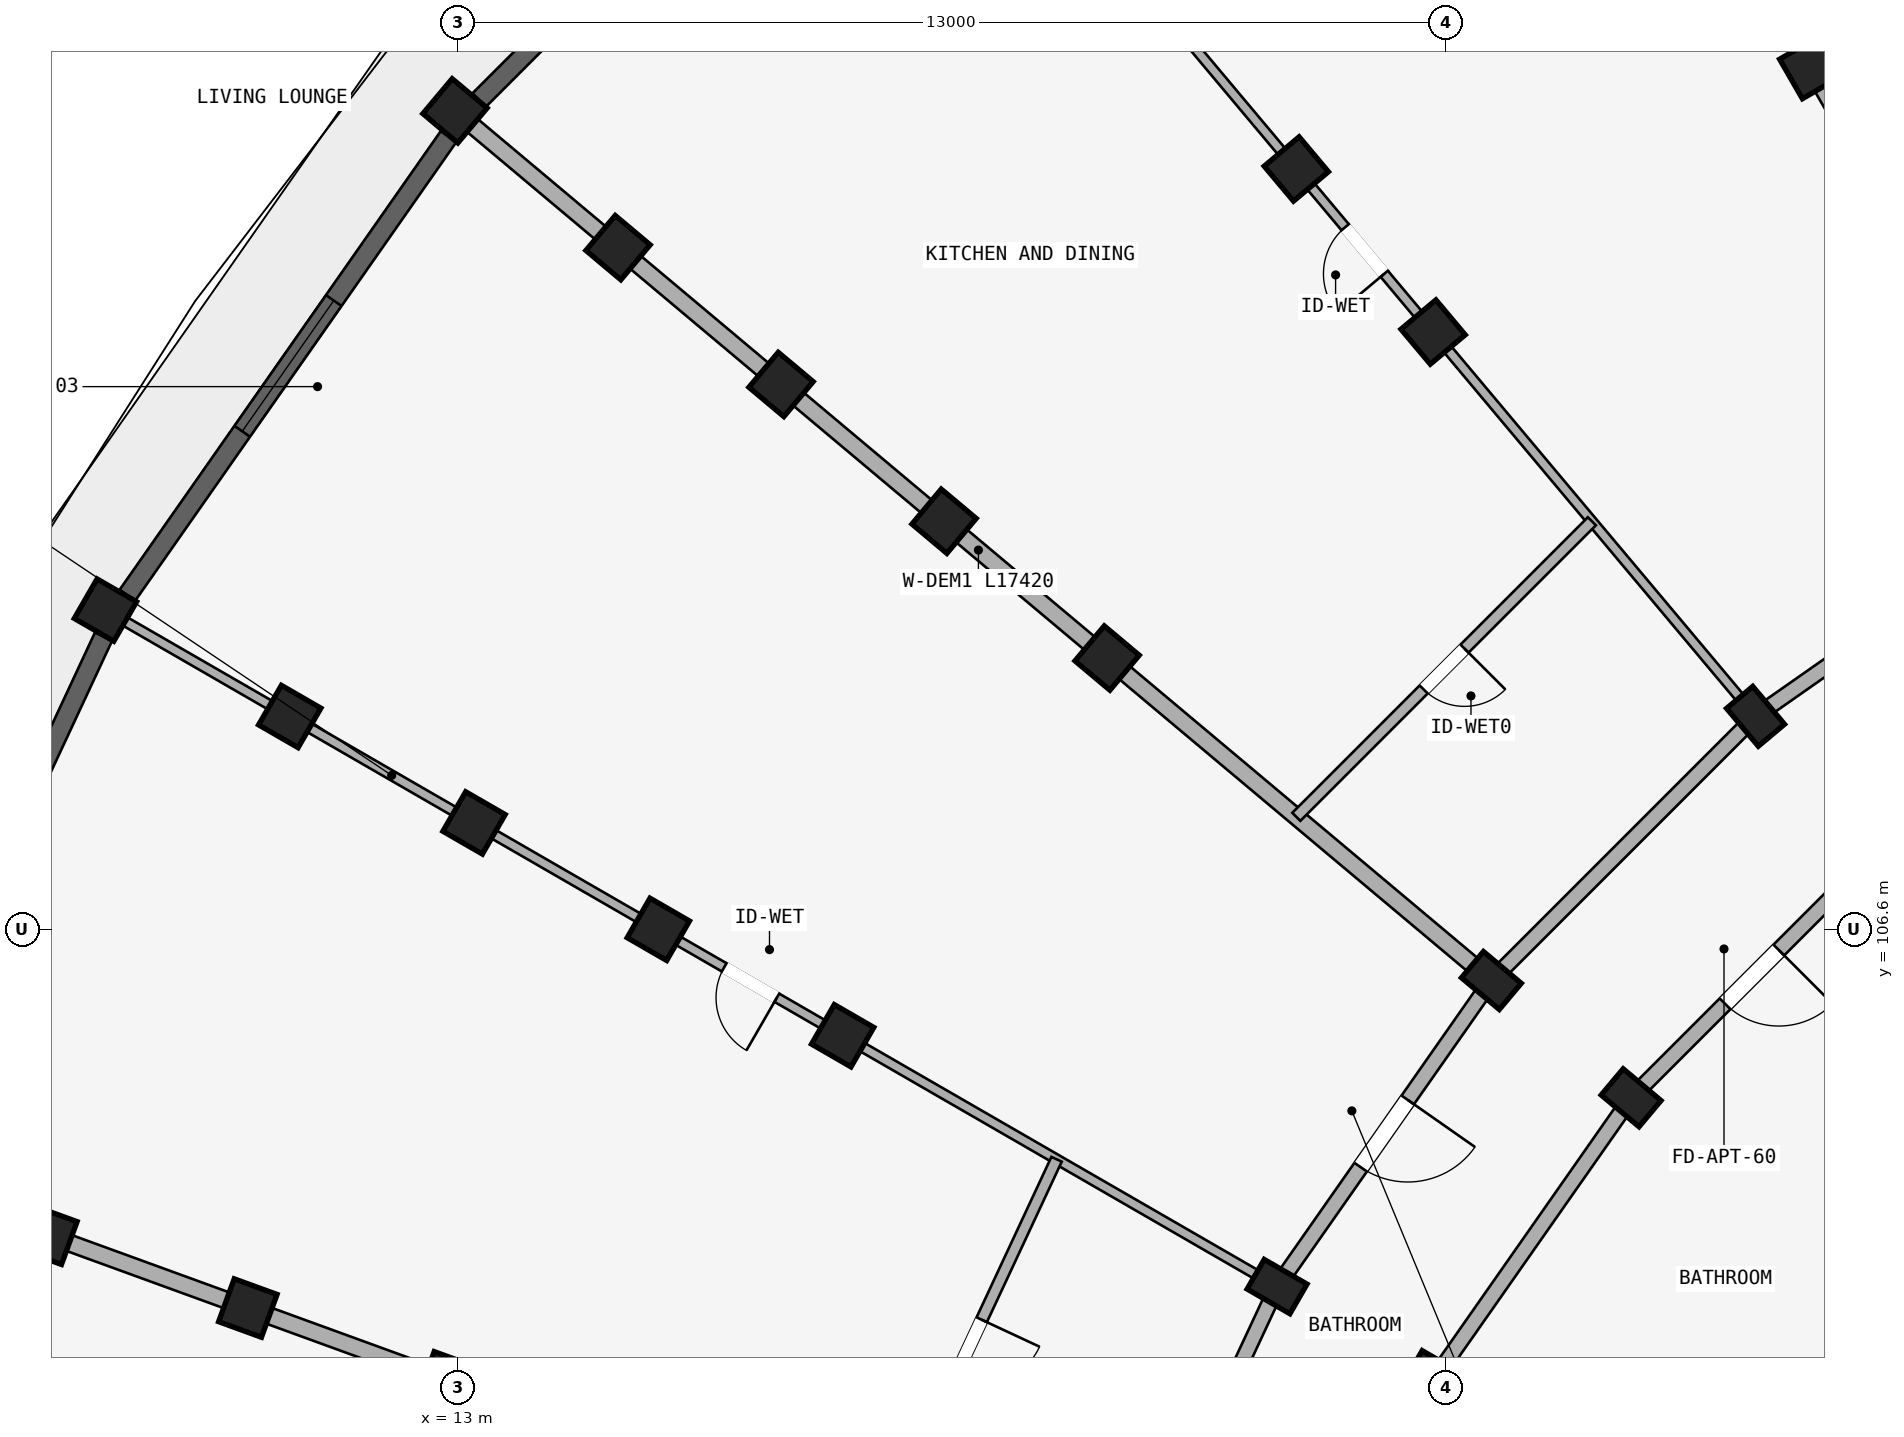
"""IFC4 building model, lengths in metres.
Left out: names, types, materials, properties, quantities, classifications, styles, units other than length and angle.
Written with IfcOpenShell. Run it as: python <this file> out.ifc"""

import sys

from ifc_helpers import new_model, si_unit, direction, frame, frame_2d, origin, origin_2d, place, context, subcontext, project, spatial, rectangle, extrude, element, fill, save


model = new_model("IFC4")
c1 = context("Model", 3, precision=1e-05, world=origin(), true_north=direction((0.0, 1.0)))
c2 = subcontext(c1, "Body", "Model", "MODEL_VIEW")
j1 = project(units=[si_unit("LENGTHUNIT", "METRE"), si_unit("PLANEANGLEUNIT", "RADIAN")], contexts=[c1])
p1 = place(None, origin())
s1 = spatial("IfcSite", under=j1, at=p1, CompositionType="ELEMENT")
p2 = place(p1, origin())
s2 = spatial("IfcBuilding", under=s1, at=p2, CompositionType="ELEMENT")
p3 = place(p2, frame((0.0, 0.0, 33.9)))
s3 = spatial("IfcBuildingStorey", under=s2, at=p3, CompositionType="ELEMENT", Elevation=33.9)
p4 = place(p3, frame((30.8, 117.938, 0.0), z_axis=(0.0, 0.0, 1.0), x_axis=(0.866025403784, 0.5, 0.0)))
e1 = element("IfcColumn", 1, at=p4, inside=s3, PredefinedType="COLUMN", context=c2, shape_type="SweptSolid", body=[
    extrude(rectangle(XDim=0.6, YDim=0.6, at=origin_2d()), origin(), (0.0, 0.0, 1.0), 2.93),
])
p5 = place(p3, frame((30.073, 109.402, 0.0), z_axis=(0.0, 0.0, 1.0), x_axis=(0.766044443119, 0.642787609687, 0.0)))
e2 = element("IfcColumn", 2, at=p5, inside=s3, PredefinedType="COLUMN", context=c2, shape_type="SweptSolid", body=[
    extrude(rectangle(XDim=0.45, YDim=0.65, at=origin_2d()), origin(), (0.0, 0.0, 1.0), 2.93),
])
for number, where, z_axis, x_axis in (
    (3, (25.831, 114.458, 0.0), (0.0, 0.0, 1.0), (0.766, 0.643, 0.0)),
    (4, (24.031, 116.603, 0.0), (0.0, 0.0, 1.0), (0.766, 0.643, 0.0)),
):
    element("IfcColumn", number, at=place(p3, frame(where, z_axis=z_axis, x_axis=x_axis)), inside=s3, PredefinedType="COLUMN", context=c2, shape_type="SweptSolid", body=[
        extrude(rectangle(XDim=0.6, YDim=0.6, at=origin_2d()), origin(), (0.0, 0.0, 1.0), 2.93),
    ])
for number, where, z_axis, x_axis in (
    (5, (28.436, 104.384, 0.0), (0.0, 0.0, 1.0), (0.643, 0.766, 0.0)),
    (6, (26.598, 105.927, 0.0), (0.0, 0.0, 1.0), (0.643, 0.766, 0.0)),
):
    element("IfcColumn", number, at=place(p3, frame(where, z_axis=z_axis, x_axis=x_axis)), inside=s3, PredefinedType="COLUMN", context=c2, shape_type="SweptSolid", body=[
        extrude(rectangle(XDim=0.45, YDim=0.65, at=origin_2d()), origin(), (0.0, 0.0, 1.0), 2.93),
    ])
for number, where, z_axis, x_axis in (
    (7, (21.542, 110.169, 0.0), (0.0, 0.0, 1.0), (0.643, 0.766, 0.0)),
    (8, (19.397, 111.969, 0.0), (0.0, 0.0, 1.0), (0.643, 0.766, 0.0)),
    (9, (17.252, 113.769, 0.0), (0.0, 0.0, 1.0), (0.643, 0.766, 0.0)),
    (10, (15.107, 115.568, 0.0), (0.0, 0.0, 1.0), (0.643, 0.766, 0.0)),
    (11, (12.962, 117.368, 0.0), (0.0, 0.0, 1.0), (0.643, 0.766, 0.0)),
):
    element("IfcColumn", number, at=place(p3, frame(where, z_axis=z_axis, x_axis=x_axis)), inside=s3, PredefinedType="COLUMN", context=c2, shape_type="SweptSolid", body=[
        extrude(rectangle(XDim=0.6, YDim=0.6, at=origin_2d()), origin(), (0.0, 0.0, 1.0), 2.93),
    ])
for number, where, z_axis, x_axis in (
    (12, (25.856, 100.7, 0.0), (0.0, 0.0, 1.0), (0.5, 0.866, 0.0)),
    (13, (23.778, 101.9, 0.0), (0.0, 0.0, 1.0), (0.5, 0.866, 0.0)),
):
    element("IfcColumn", number, at=place(p3, frame(where, z_axis=z_axis, x_axis=x_axis)), inside=s3, PredefinedType="COLUMN", context=c2, shape_type="SweptSolid", body=[
        extrude(rectangle(XDim=0.45, YDim=0.65, at=origin_2d()), origin(), (0.0, 0.0, 1.0), 2.93),
    ])
for number, where, z_axis, x_axis in (
    (14, (18.062, 105.2, 0.0), (0.0, 0.0, 1.0), (0.5, 0.866, 0.0)),
    (15, (15.637, 106.6, 0.0), (0.0, 0.0, 1.0), (0.5, 0.866, 0.0)),
    (16, (13.213, 108.0, 0.0), (0.0, 0.0, 1.0), (0.5, 0.866, 0.0)),
    (17, (10.788, 109.4, 0.0), (0.0, 0.0, 1.0), (0.5, 0.866, 0.0)),
    (18, (8.363, 110.8, 0.0), (0.0, 0.0, 1.0), (0.5, 0.866, 0.0)),
    (19, (12.868, 100.66, 0.0), (0.0, 0.0, 1.0), (0.342, 0.94, 0.0)),
    (20, (10.236, 101.618, 0.0), (0.0, 0.0, 1.0), (0.342, 0.94, 0.0)),
    (21, (7.605, 102.575, 0.0), (0.0, 0.0, 1.0), (0.342, 0.94, 0.0)),
):
    element("IfcColumn", number, at=place(p3, frame(where, z_axis=z_axis, x_axis=x_axis)), inside=s3, PredefinedType="COLUMN", context=c2, shape_type="SweptSolid", body=[
        extrude(rectangle(XDim=0.6, YDim=0.6, at=origin_2d()), origin(), (0.0, 0.0, 1.0), 2.93),
    ])
p6 = place(p3, frame((34.1, 112.222, 0.0), z_axis=(0.0, 0.0, 1.0), x_axis=(-0.819140911474, -0.573592335331, 0.0)))
e22 = element("IfcWall", 22, at=p6, inside=s3, PredefinedType="STANDARD", context=c2, shape_type="SweptSolid", body=[
    extrude(rectangle(XDim=4.916, YDim=0.2, at=frame_2d((2.458, 0.0))), origin(), (0.0, 0.0, 1.0), 2.372),
])
p7 = place(p6, frame((1.938, 0.0, 0.0)))
e23 = element("IfcOpeningElement", 23, at=p7, cuts=e22, PredefinedType="OPENING", context=c2, shape_type="SweptSolid", body=[
    extrude(rectangle(XDim=1.04, YDim=2.15, at=frame_2d((0.52, 1.075))), frame((0.0, 0.11, 0.0), z_axis=(0.0, -1.0, 0.0), x_axis=(1.0, 0.0, 0.0)), (0.0, 0.0, 1.0), 0.22),
])
p8 = place(p3, frame((31.616, 107.564, 0.0), z_axis=(0.0, 0.0, 1.0), x_axis=(-0.707106781187, -0.707106781187, 0.0)))
e24 = element("IfcWall", 24, at=p8, inside=s3, PredefinedType="STANDARD", context=c2, shape_type="SweptSolid", body=[
    extrude(rectangle(XDim=4.497, YDim=0.2, at=frame_2d((2.249, 0.0))), origin(), (0.0, 0.0, 1.0), 2.372),
])
p9 = place(p8, frame((1.749, 0.0, 0.0)))
e25 = element("IfcOpeningElement", 25, at=p9, cuts=e24, PredefinedType="OPENING", context=c2, shape_type="SweptSolid", body=[
    extrude(rectangle(XDim=1.0, YDim=2.15, at=frame_2d((0.5, 1.075))), frame((0.0, 0.11, 0.0), z_axis=(0.0, -1.0, 0.0), x_axis=(1.0, 0.0, 0.0)), (0.0, 0.0, 1.0), 0.22),
])
p10 = place(p3, frame((30.073, 109.402, 0.0), z_axis=(0.0, 0.0, 1.0), x_axis=(-0.707106781187, -0.707106781187, 0.0)))
e26 = element("IfcWall", 26, at=p10, inside=s3, PredefinedType="STANDARD", context=c2, shape_type="SweptSolid", body=[
    extrude(rectangle(XDim=4.916, YDim=0.2, at=frame_2d((2.458, 0.0))), origin(), (0.0, 0.0, 1.0), 2.372),
])
p11 = place(p3, frame((28.436, 104.384, 0.0), z_axis=(0.0, 0.0, 1.0), x_axis=(-0.573571637217, -0.819155404658, 0.0)))
e27 = element("IfcWall", 27, at=p11, inside=s3, PredefinedType="STANDARD", context=c2, shape_type="SweptSolid", body=[
    extrude(rectangle(XDim=4.497, YDim=0.2, at=frame_2d((2.249, 0.0))), origin(), (0.0, 0.0, 1.0), 2.372),
])
p12 = place(p3, frame((26.598, 105.927, 0.0), z_axis=(0.0, 0.0, 1.0), x_axis=(-0.573592335331, -0.819140911474, 0.0)))
e28 = element("IfcWall", 28, at=p12, inside=s3, PredefinedType="STANDARD", context=c2, shape_type="SweptSolid", body=[
    extrude(rectangle(XDim=4.916, YDim=0.2, at=frame_2d((2.458, 0.0))), origin(), (0.0, 0.0, 1.0), 2.372),
])
p13 = place(p12, frame((1.918, 0.0, 0.0)))
e29 = element("IfcOpeningElement", 29, at=p13, cuts=e28, PredefinedType="OPENING", context=c2, shape_type="SweptSolid", body=[
    extrude(rectangle(XDim=1.08, YDim=2.15, at=frame_2d((0.54, 1.075))), frame((0.0, 0.11, 0.0), z_axis=(0.0, -1.0, 0.0), x_axis=(1.0, 0.0, 0.0)), (0.0, 0.0, 1.0), 0.22),
])
p14 = place(p3, frame((23.778, 101.9, 0.0), z_axis=(0.0, 0.0, 1.0), x_axis=(-0.422629854778, -0.906302381024, 0.0)))
e30 = element("IfcWall", 30, at=p14, inside=s3, PredefinedType="STANDARD", context=c2, shape_type="SweptSolid", body=[
    extrude(rectangle(XDim=4.915, YDim=0.2, at=frame_2d((2.458, 0.0))), origin(), (0.0, 0.0, 1.0), 2.372),
])
p15 = place(p3, frame((34.05, 112.309, 0.0), z_axis=(0.0, 0.0, 1.0), x_axis=(-0.499997843263, 0.866026648973, 0.0)))
e31 = element("IfcWall", 31, at=p15, inside=s3, PredefinedType="STANDARD", context=c2, shape_type="SweptSolid", body=[
    extrude(rectangle(XDim=17.42, YDim=0.22, at=frame_2d((8.71, 0.0))), origin(), (0.0, 0.0, 1.0), 2.372),
])
p16 = place(p3, frame((30.009, 109.479, 0.0), z_axis=(0.0, 0.0, 1.0), x_axis=(-0.642784757967, 0.766046835987, 0.0)))
e32 = element("IfcWall", 32, at=p16, inside=s3, PredefinedType="PARTITIONING", context=c2, shape_type="SweptSolid", body=[
    extrude(rectangle(XDim=17.42, YDim=0.125, at=frame_2d((8.71, 0.0))), origin(), (0.0, 0.0, 1.0), 2.372),
])
p17 = place(p16, frame((7.5, 0.0, 0.0)))
e33 = element("IfcOpeningElement", 33, at=p17, cuts=e32, PredefinedType="OPENING", context=c2, shape_type="SweptSolid", body=[
    extrude(rectangle(XDim=0.8, YDim=2.1, at=frame_2d((0.4, 1.05))), frame((0.0, 0.073, 0.0), z_axis=(0.0, -1.0, 0.0), x_axis=(1.0, 0.0, 0.0)), (0.0, 0.0, 1.0), 0.145),
])
p18 = place(p3, frame((26.521, 105.991, 0.0), z_axis=(0.0, 0.0, 1.0), x_axis=(-0.766046835987, 0.642784757967, 0.0)))
e34 = element("IfcWall", 34, at=p18, inside=s3, PredefinedType="STANDARD", context=c2, shape_type="SweptSolid", body=[
    extrude(rectangle(XDim=17.42, YDim=0.22, at=frame_2d((8.71, 0.0))), origin(), (0.0, 0.0, 1.0), 2.372),
])
p19 = place(p3, frame((23.691, 101.95, 0.0), z_axis=(0.0, 0.0, 1.0), x_axis=(-0.866026648973, 0.499997843263, 0.0)))
e35 = element("IfcWall", 35, at=p19, inside=s3, PredefinedType="PARTITIONING", context=c2, shape_type="SweptSolid", body=[
    extrude(rectangle(XDim=17.42, YDim=0.125, at=frame_2d((8.71, 0.0))), origin(), (0.0, 0.0, 1.0), 2.372),
])
p20 = place(p19, frame((7.5, 0.0, 0.0)))
e36 = element("IfcOpeningElement", 36, at=p20, cuts=e35, PredefinedType="OPENING", context=c2, shape_type="SweptSolid", body=[
    extrude(rectangle(XDim=0.8, YDim=2.1, at=frame_2d((0.4, 1.05))), frame((0.0, 0.073, 0.0), z_axis=(0.0, -1.0, 0.0), x_axis=(1.0, 0.0, 0.0)), (0.0, 0.0, 1.0), 0.145),
])
p21 = place(p3, frame((21.607, 97.479, 0.0), z_axis=(0.0, 0.0, 1.0), x_axis=(-0.939691901159, 0.342022120477, 0.0)))
e37 = element("IfcWall", 37, at=p21, inside=s3, PredefinedType="STANDARD", context=c2, shape_type="SweptSolid", body=[
    extrude(rectangle(XDim=17.42, YDim=0.22, at=frame_2d((8.71, 0.0))), origin(), (0.0, 0.0, 1.0), 2.372),
])
p22 = place(p3, frame((27.92, 111.969, 0.0), z_axis=(0.0, 0.0, 1.0), x_axis=(-0.707106781187, -0.707106781187, 0.0)))
e38 = element("IfcWall", 38, at=p22, inside=s3, PredefinedType="PLUMBINGWALL", context=c2, shape_type="SweptSolid", body=[
    extrude(rectangle(XDim=5.5, YDim=0.15, at=frame_2d((2.75, 0.0))), origin(), (0.0, 0.0, 1.0), 2.372),
])
p23 = place(p22, frame((2.37, 0.0, 0.0)))
e39 = element("IfcOpeningElement", 39, at=p23, cuts=e38, PredefinedType="OPENING", context=c2, shape_type="SweptSolid", body=[
    extrude(rectangle(XDim=0.76, YDim=2.05, at=frame_2d((0.38, 1.025))), frame((0.0, 0.085, 0.0), z_axis=(0.0, -1.0, 0.0), x_axis=(1.0, 0.0, 0.0)), (0.0, 0.0, 1.0), 0.17),
])
p24 = place(p3, frame((20.877, 103.575, 0.0), z_axis=(0.0, 0.0, 1.0), x_axis=(-0.422630264446, -0.906302189986, 0.0)))
e40 = element("IfcWall", 40, at=p24, inside=s3, PredefinedType="PLUMBINGWALL", context=c2, shape_type="SweptSolid", body=[
    extrude(rectangle(XDim=5.5, YDim=0.15, at=frame_2d((2.75, 0.0))), origin(), (0.0, 0.0, 1.0), 2.372),
])
p25 = place(p24, frame((2.33, 0.0, 0.0)))
e41 = element("IfcOpeningElement", 41, at=p25, cuts=e40, PredefinedType="OPENING", context=c2, shape_type="SweptSolid", body=[
    extrude(rectangle(XDim=0.84, YDim=2.1, at=frame_2d((0.42, 1.05))), frame((0.0, 0.085, 0.0), z_axis=(0.0, -1.0, 0.0), x_axis=(1.0, 0.0, 0.0)), (0.0, 0.0, 1.0), 0.17),
])
p26 = place(p3, frame((18.49, 122.719, 0.0), z_axis=(0.0, 0.0, 1.0), x_axis=(-0.707106781187, -0.707106781187, 0.0)))
e42 = element("IfcWall", 42, at=p26, inside=s3, PredefinedType="STANDARD", context=c2, shape_type="SweptSolid", body=[
    extrude(rectangle(XDim=7.367, YDim=0.25, at=frame_2d((3.684, 0.0))), origin(), (0.0, 0.0, 1.0), 2.472),
])
p27 = place(p26, frame((4.84, 0.0, 0.322)))
e43 = element("IfcOpeningElement", 43, at=p27, cuts=e42, PredefinedType="OPENING", context=c2, shape_type="SweptSolid", body=[
    extrude(rectangle(XDim=1.2, YDim=1.5, at=frame_2d((0.6, 0.75))), frame((0.0, 0.135, 0.0), z_axis=(0.0, -1.0, 0.0), x_axis=(1.0, 0.0, 0.0)), (0.0, 0.0, 1.0), 0.27),
])
p28 = place(p26, frame((1.918, 0.0, 0.0)))
e44 = element("IfcOpeningElement", 44, at=p28, cuts=e42, PredefinedType="OPENING", context=c2, shape_type="SweptSolid", body=[
    extrude(rectangle(XDim=1.32, YDim=2.15, at=frame_2d((0.66, 1.075))), frame((0.0, 0.135, 0.0), z_axis=(0.0, -1.0, 0.0), x_axis=(1.0, 0.0, 0.0)), (0.0, 0.0, 1.0), 0.27),
])
p29 = place(p3, frame((12.878, 117.03, 0.0), z_axis=(0.0, 0.0, 1.0), x_axis=(-0.573582441919, -0.819147839112, 0.0)))
e45 = element("IfcWall", 45, at=p29, inside=s3, PredefinedType="STANDARD", context=c2, shape_type="SweptSolid", body=[
    extrude(rectangle(XDim=7.367, YDim=0.25, at=frame_2d((3.684, 0.0))), origin(), (0.0, 0.0, 1.0), 2.472),
])
p30 = place(p29, frame((2.634, 0.0, 0.472)))
e46 = element("IfcOpeningElement", 46, at=p30, cuts=e45, PredefinedType="OPENING", context=c2, shape_type="SweptSolid", body=[
    extrude(rectangle(XDim=2.1, YDim=1.8, at=frame_2d((1.05, 0.9))), frame((0.0, 0.135, 0.0), z_axis=(0.0, -1.0, 0.0), x_axis=(1.0, 0.0, 0.0)), (0.0, 0.0, 1.0), 0.27),
])
p31 = place(p3, frame((8.338, 110.452, 0.0), z_axis=(0.0, 0.0, 1.0), x_axis=(-0.422589730823, -0.906321090675, 0.0)))
e47 = element("IfcWall", 47, at=p31, inside=s3, PredefinedType="STANDARD", context=c2, shape_type="SweptSolid", body=[
    extrude(rectangle(XDim=7.367, YDim=0.25, at=frame_2d((3.684, 0.0))), origin(), (0.0, 0.0, 1.0), 2.472),
])
p32 = place(p31, frame((2.708, 0.0, 0.422)))
e48 = element("IfcOpeningElement", 48, at=p32, cuts=e47, PredefinedType="OPENING", context=c2, shape_type="SweptSolid", body=[
    extrude(rectangle(XDim=1.95, YDim=1.85, at=frame_2d((0.975, 0.925))), frame((0.0, 0.135, 0.0), z_axis=(0.0, -1.0, 0.0), x_axis=(1.0, 0.0, 0.0)), (0.0, 0.0, 1.0), 0.27),
])
p33 = place(p30, origin())
e49 = element("IfcWindow", 49, at=p33, inside=s3, PartitioningType="TRIPLE_PANEL_VERTICAL", PredefinedType="WINDOW", context=c2, shape_type="SweptSolid", body=[
    extrude(rectangle(XDim=2.1, YDim=1.8, at=frame_2d((1.05, 0.9))), frame((0.0, 0.03, 0.0), z_axis=(0.0, -1.0, 0.0), x_axis=(1.0, 0.0, 0.0)), (0.0, 0.0, 1.0), 0.06),
])
fill(e46, e49)
p34 = place(p17, frame((0.8, 0.0, 0.0), z_axis=(0.0, 0.0, 1.0), x_axis=(-1.0, 0.0, 0.0)))
e50 = element("IfcDoor", 50, at=p34, inside=s3, OperationType="SINGLE_SWING_RIGHT", PredefinedType="DOOR", context=c2, shape_type="SweptSolid", body=[
    extrude(rectangle(XDim=0.8, YDim=2.1, at=frame_2d((0.4, 1.05))), frame((0.0, 0.025, 0.0), z_axis=(0.0, -1.0, 0.0), x_axis=(1.0, 0.0, 0.0)), (0.0, 0.0, 1.0), 0.05),
])
fill(e33, e50)
p35 = place(p20, origin())
e51 = element("IfcDoor", 51, at=p35, inside=s3, OperationType="SINGLE_SWING_LEFT", PredefinedType="DOOR", context=c2, shape_type="SweptSolid", body=[
    extrude(rectangle(XDim=0.8, YDim=2.1, at=frame_2d((0.4, 1.05))), frame((0.0, 0.025, 0.0), z_axis=(0.0, -1.0, 0.0), x_axis=(1.0, 0.0, 0.0)), (0.0, 0.0, 1.0), 0.05),
])
fill(e36, e51)
p36 = place(p23, frame((0.76, 0.0, 0.0), z_axis=(0.0, 0.0, 1.0), x_axis=(-1.0, 0.0, 0.0)))
e52 = element("IfcDoor", 52, at=p36, inside=s3, OperationType="SINGLE_SWING_RIGHT", PredefinedType="DOOR", context=c2, shape_type="SweptSolid", body=[
    extrude(rectangle(XDim=0.76, YDim=2.05, at=frame_2d((0.38, 1.025))), frame((0.0, 0.025, 0.0), z_axis=(0.0, -1.0, 0.0), x_axis=(1.0, 0.0, 0.0)), (0.0, 0.0, 1.0), 0.05),
])
fill(e39, e52)
p37 = place(p13, origin())
e53 = element("IfcDoor", 53, at=p37, inside=s3, OperationType="SINGLE_SWING_LEFT", PredefinedType="DOOR", context=c2, shape_type="SweptSolid", body=[
    extrude(rectangle(XDim=1.08, YDim=2.15, at=frame_2d((0.54, 1.075))), frame((0.0, 0.025, 0.0), z_axis=(0.0, -1.0, 0.0), x_axis=(1.0, 0.0, 0.0)), (0.0, 0.0, 1.0), 0.05),
])
fill(e29, e53)
p38 = place(p25, frame((0.84, 0.0, 0.0), z_axis=(0.0, 0.0, 1.0), x_axis=(-1.0, 0.0, 0.0)))
e54 = element("IfcDoor", 54, at=p38, inside=s3, OperationType="SINGLE_SWING_RIGHT", PredefinedType="DOOR", context=c2, shape_type="SweptSolid", body=[
    extrude(rectangle(XDim=0.84, YDim=2.1, at=frame_2d((0.42, 1.05))), frame((0.0, 0.025, 0.0), z_axis=(0.0, -1.0, 0.0), x_axis=(1.0, 0.0, 0.0)), (0.0, 0.0, 1.0), 0.05),
])
fill(e41, e54)
p39 = place(p9, origin())
e55 = element("IfcDoor", 55, at=p39, inside=s3, OperationType="SINGLE_SWING_LEFT", PredefinedType="DOOR", context=c2, shape_type="SweptSolid", body=[
    extrude(rectangle(XDim=1.0, YDim=2.15, at=frame_2d((0.5, 1.075))), frame((0.0, 0.025, 0.0), z_axis=(0.0, -1.0, 0.0), x_axis=(1.0, 0.0, 0.0)), (0.0, 0.0, 1.0), 0.05),
])
fill(e25, e55)
save(model, sys.argv[1])
